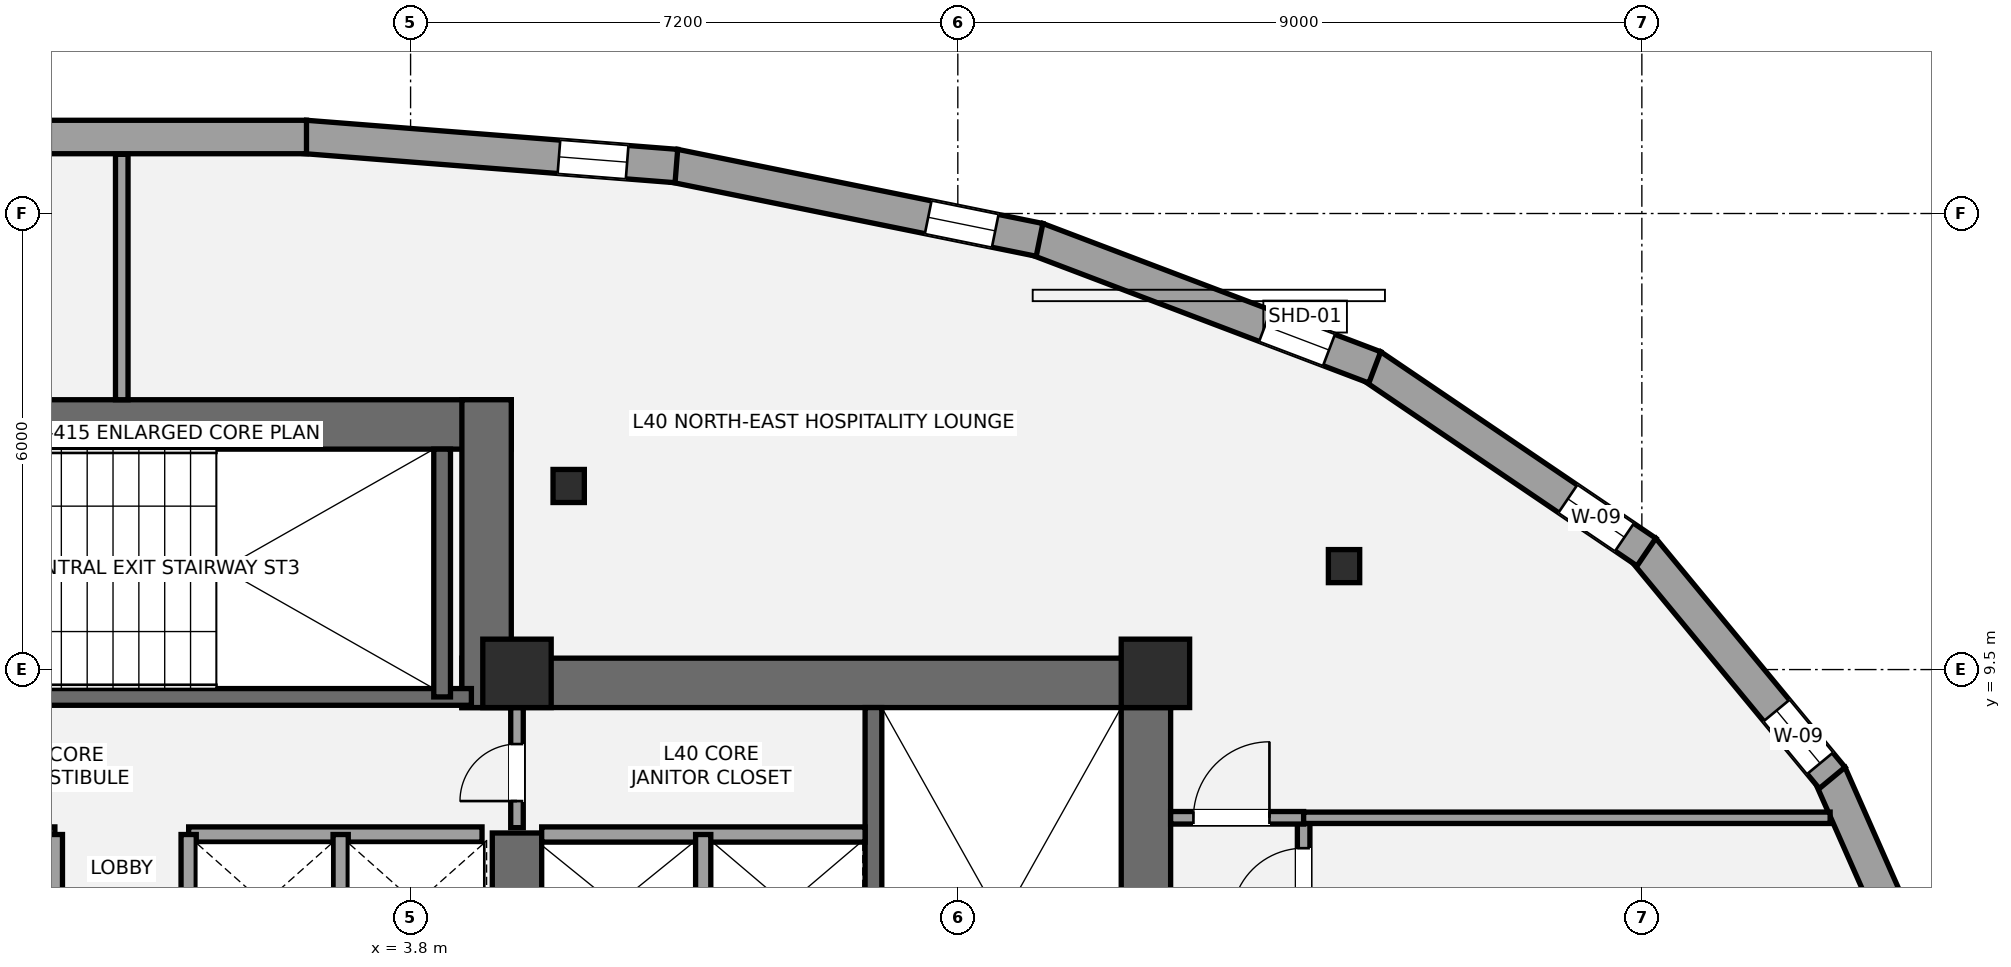
"""IFC4 building model, lengths in metres.
Left out: names, types, materials, properties, quantities, classifications, styles, units other than length and angle.
Written with IfcOpenShell. Run it as: python <this file> out.ifc"""

import sys

from ifc_helpers import new_model, si_unit, direction, frame, frame_2d, origin, origin_2d, place, context, subcontext, project, spatial, rectangle, i_section, extrude, element, fill, save


model = new_model("IFC4")
c1 = context("Model", 3, precision=1e-05, world=origin(), true_north=direction((0.0, 1.0)))
c2 = subcontext(c1, "Body", "Model", "MODEL_VIEW")
j1 = project(units=[si_unit("LENGTHUNIT", "METRE"), si_unit("PLANEANGLEUNIT", "RADIAN")], contexts=[c1])
p1 = place(None, origin())
s1 = spatial("IfcSite", under=j1, at=p1, CompositionType="ELEMENT")
p2 = place(p1, origin())
s2 = spatial("IfcBuilding", under=s1, at=p2, CompositionType="ELEMENT")
p3 = place(p2, frame((0.0, 0.0, 150.2)))
s3 = spatial("IfcBuildingStorey", under=s2, at=p3, CompositionType="ELEMENT", Elevation=150.2)
p4 = place(p3, frame((13.475, 1.2, 0.0), z_axis=(0.0, 0.0, 1.0), x_axis=(0.0, 1.0, 0.0)))
e1 = element("IfcWall", 1, at=p4, inside=s3, PredefinedType="SHEAR", context=c2, shape_type="SweptSolid", body=[
    extrude(rectangle(XDim=8.45, YDim=0.65, at=frame_2d((4.225, 0.0))), origin(), (0.0, 0.0, 1.0), 3.2),
])
p5 = place(p3, frame((4.475, 9.325, 0.0), z_axis=(0.0, 0.0, 1.0), x_axis=(1.0, 0.0, 0.0)))
e2 = element("IfcWall", 2, at=p5, inside=s3, PredefinedType="SHEAR", context=c2, shape_type="SweptSolid", body=[
    extrude(rectangle(XDim=9.325, YDim=0.65, at=frame_2d((4.663, 0.0))), origin(), (0.0, 0.0, 1.0), 3.2),
])
p6 = place(p3, frame((5.2, 5.35, 0.0), z_axis=(0.0, 0.0, 1.0), x_axis=(0.0, 1.0, 0.0)))
e3 = element("IfcWall", 3, at=p6, inside=s3, PredefinedType="SHEAR", context=c2, shape_type="SweptSolid", body=[
    extrude(rectangle(XDim=2.0, YDim=0.65, at=frame_2d((1.0, 0.0))), origin(), (0.0, 0.0, 1.0), 3.2),
])
p7 = place(p3, frame((9.89, 1.85, 0.0), z_axis=(0.0, 0.0, 1.0), x_axis=(0.0, 1.0, 0.0)))
e4 = element("IfcWall", 4, at=p7, inside=s3, PredefinedType="SHEAR", context=c2, shape_type="SweptSolid", body=[
    extrude(rectangle(XDim=7.15, YDim=0.22, at=frame_2d((3.575, 0.0))), origin(), (0.0, 0.0, 1.0), 3.2),
])
p8 = place(p3, frame((-5.125, 12.725, 0.0), z_axis=(0.0, 0.0, 1.0), x_axis=(1.0, 0.0, 0.0)))
e5 = element("IfcWall", 5, at=p8, inside=s3, PredefinedType="SHEAR", context=c2, shape_type="SweptSolid", body=[
    extrude(rectangle(XDim=10.25, YDim=0.65, at=frame_2d((5.125, 0.0))), origin(), (0.0, 0.0, 1.0), 3.2),
])
p9 = place(p3, frame((4.8, 9.0, 0.0), z_axis=(0.0, 0.0, 1.0), x_axis=(0.0, 1.0, 0.0)))
e6 = element("IfcWall", 6, at=p9, inside=s3, PredefinedType="SHEAR", context=c2, shape_type="SweptSolid", body=[
    extrude(rectangle(XDim=4.05, YDim=0.65, at=frame_2d((2.025, 0.0))), origin(), (0.0, 0.0, 1.0), 3.2),
])
p10 = place(p3, frame((-4.7, 9.14, 0.0), z_axis=(0.0, 0.0, 1.0), x_axis=(1.0, 0.0, 0.0)))
e7 = element("IfcWall", 7, at=p10, inside=s3, PredefinedType="SHEAR", context=c2, shape_type="SweptSolid", body=[
    extrude(rectangle(XDim=9.3, YDim=0.22, at=frame_2d((4.65, 0.0))), origin(), (0.0, 0.0, 1.0), 3.2),
])
p11 = place(p10, frame((1.15, 0.0, 0.0)))
e8 = element("IfcOpeningElement", 8, at=p11, cuts=e7, PredefinedType="OPENING", context=c2, shape_type="SweptSolid", body=[
    extrude(rectangle(XDim=1.05, YDim=2.15, at=frame_2d((0.525, 1.075))), frame((0.0, 0.12, 0.0), z_axis=(0.0, -1.0, 0.0), x_axis=(1.0, 0.0, 0.0)), (0.0, 0.0, 1.0), 0.24),
])
p12 = place(p3, frame((4.215, 9.14, 0.0), z_axis=(0.0, 0.0, 1.0), x_axis=(0.0, 1.0, 0.0)))
e9 = element("IfcWall", 9, at=p12, inside=s3, PredefinedType="SHEAR", context=c2, shape_type="SweptSolid", body=[
    extrude(rectangle(XDim=3.26, YDim=0.22, at=frame_2d((1.63, 0.0))), origin(), (0.0, 0.0, 1.0), 3.2),
])
for number, where, z_axis, x_axis in (
    (10, (5.2, 9.45, 0.0), (0.0, 0.0, 1.0), (1.0, 0.0, 0.0)),
    (11, (13.6, 9.45, 0.0), (0.0, 0.0, 1.0), (1.0, 0.0, 0.0)),
):
    element("IfcColumn", number, at=place(p3, frame(where, z_axis=z_axis, x_axis=x_axis)), inside=s3, PredefinedType="COLUMN", context=c2, shape_type="SweptSolid", body=[
        extrude(rectangle(XDim=0.9, YDim=0.9, at=origin_2d()), origin(), (0.0, 0.0, 1.0), 3.2),
    ])
for number, where, z_axis, x_axis in (
    (12, (16.082, 10.861, 0.0), (0.0, 0.0, 1.0), (1.0, 0.0, 0.0)),
    (13, (5.88, 11.915, 0.0), (0.0, 0.0, 1.0), (1.0, 0.0, 0.0)),
):
    element("IfcColumn", number, at=place(p3, frame(where, z_axis=z_axis, x_axis=x_axis)), inside=s3, PredefinedType="COLUMN", context=c2, shape_type="SweptSolid", body=[
        extrude(i_section(OverallWidth=0.412, OverallDepth=0.435, WebThickness=0.036, FlangeThickness=0.057, at=origin_2d()), origin(), (0.0, 0.0, 1.0), 3.2),
    ])
p13 = place(p3, frame((22.472, 8.126, 0.0), z_axis=(0.0, 0.0, 1.0), x_axis=(0.403999745193, -0.914759097186, 0.0)))
e14 = element("IfcWall", 14, at=p13, inside=s3, PredefinedType="STANDARD", context=c2, shape_type="SweptSolid", body=[
    extrude(rectangle(XDim=3.561, YDim=0.44, at=frame_2d((1.78, 0.0))), origin(), (0.0, 0.0, 1.0), 2.315),
])
p14 = place(p3, frame((20.014, 11.088, 0.0), z_axis=(0.0, 0.0, 1.0), x_axis=(0.637002505989, -0.77086173038, 0.0)))
e15 = element("IfcWall", 15, at=p14, inside=s3, PredefinedType="STANDARD", context=c2, shape_type="SweptSolid", body=[
    extrude(rectangle(XDim=3.908, YDim=0.44, at=frame_2d((1.954, 0.0))), origin(), (0.0, 0.0, 1.0), 2.315),
])
p15 = place(p14, frame((2.76, 0.0, 0.58)))
e16 = element("IfcOpeningElement", 16, at=p15, cuts=e15, PredefinedType="OPENING", context=c2, shape_type="SweptSolid", body=[
    extrude(rectangle(XDim=0.9, YDim=1.35, at=frame_2d((0.45, 0.675))), frame((0.0, 0.23, 0.0), z_axis=(0.0, -1.0, 0.0), x_axis=(1.0, 0.0, 0.0)), (0.0, 0.0, 1.0), 0.46),
])
p16 = place(p3, frame((16.441, 13.499, 0.0), z_axis=(0.0, 0.0, 1.0), x_axis=(0.827782339513, -0.561049372507, 0.0)))
e17 = element("IfcWall", 17, at=p16, inside=s3, PredefinedType="STANDARD", context=c2, shape_type="SweptSolid", body=[
    extrude(rectangle(XDim=4.372, YDim=0.44, at=frame_2d((2.186, 0.0))), origin(), (0.0, 0.0, 1.0), 2.315),
])
p17 = place(p16, frame((3.124, 0.0, 0.58)))
e18 = element("IfcOpeningElement", 18, at=p17, cuts=e17, PredefinedType="OPENING", context=c2, shape_type="SweptSolid", body=[
    extrude(rectangle(XDim=0.9, YDim=1.35, at=frame_2d((0.45, 0.675))), frame((0.0, 0.23, 0.0), z_axis=(0.0, -1.0, 0.0), x_axis=(1.0, 0.0, 0.0)), (0.0, 0.0, 1.0), 0.46),
])
p18 = place(p3, frame((12.041, 15.163, 0.0), z_axis=(0.0, 0.0, 1.0), x_axis=(0.93488004884, -0.354963792916, 0.0)))
e19 = element("IfcWall", 19, at=p18, inside=s3, PredefinedType="STANDARD", context=c2, shape_type="SweptSolid", body=[
    extrude(rectangle(XDim=4.755, YDim=0.44, at=frame_2d((2.377, 0.0))), origin(), (0.0, 0.0, 1.0), 2.315),
])
p19 = place(p18, frame((3.21, 0.0, 0.58)))
e20 = element("IfcOpeningElement", 20, at=p19, cuts=e19, PredefinedType="OPENING", context=c2, shape_type="SweptSolid", body=[
    extrude(rectangle(XDim=0.9, YDim=1.35, at=frame_2d((0.45, 0.675))), frame((0.0, 0.23, 0.0), z_axis=(0.0, -1.0, 0.0), x_axis=(1.0, 0.0, 0.0)), (0.0, 0.0, 1.0), 0.46),
])
p20 = place(p3, frame((7.271, 16.128, 0.0), z_axis=(0.0, 0.0, 1.0), x_axis=(0.980021305588, -0.198892535291, 0.0)))
e21 = element("IfcWall", 21, at=p20, inside=s3, PredefinedType="STANDARD", context=c2, shape_type="SweptSolid", body=[
    extrude(rectangle(XDim=4.903, YDim=0.44, at=frame_2d((2.451, 0.0))), origin(), (0.0, 0.0, 1.0), 2.315),
])
p21 = place(p20, frame((3.408, 0.0, 0.58)))
e22 = element("IfcOpeningElement", 22, at=p21, cuts=e21, PredefinedType="OPENING", context=c2, shape_type="SweptSolid", body=[
    extrude(rectangle(XDim=0.9, YDim=1.35, at=frame_2d((0.45, 0.675))), frame((0.0, 0.23, 0.0), z_axis=(0.0, -1.0, 0.0), x_axis=(1.0, 0.0, 0.0)), (0.0, 0.0, 1.0), 0.46),
])
p22 = place(p3, frame((2.413, 16.507, 0.0), z_axis=(0.0, 0.0, 1.0), x_axis=(0.996946218403, -0.078091213409, 0.0)))
e23 = element("IfcWall", 23, at=p22, inside=s3, PredefinedType="STANDARD", context=c2, shape_type="SweptSolid", body=[
    extrude(rectangle(XDim=4.899, YDim=0.44, at=frame_2d((2.449, 0.0))), origin(), (0.0, 0.0, 1.0), 2.315),
])
p23 = place(p22, frame((3.349, 0.0, 0.58)))
e24 = element("IfcOpeningElement", 24, at=p23, cuts=e23, PredefinedType="OPENING", context=c2, shape_type="SweptSolid", body=[
    extrude(rectangle(XDim=0.9, YDim=1.35, at=frame_2d((0.45, 0.675))), frame((0.0, 0.23, 0.0), z_axis=(0.0, -1.0, 0.0), x_axis=(1.0, 0.0, 0.0)), (0.0, 0.0, 1.0), 0.46),
])
p24 = place(p3, frame((-2.43, 16.507, 0.0), z_axis=(0.0, 0.0, 1.0), x_axis=(1.0, 0.0, 0.0)))
e25 = element("IfcWall", 25, at=p24, inside=s3, PredefinedType="STANDARD", context=c2, shape_type="SweptSolid", body=[
    extrude(rectangle(XDim=4.861, YDim=0.44, at=frame_2d((2.43, 0.0))), origin(), (0.0, 0.0, 1.0), 2.315),
])
p25 = place(p24, frame((0.596, 0.0, 0.58)))
e26 = element("IfcOpeningElement", 26, at=p25, cuts=e25, PredefinedType="OPENING", context=c2, shape_type="SweptSolid", body=[
    extrude(rectangle(XDim=0.9, YDim=1.35, at=frame_2d((0.45, 0.675))), frame((0.0, 0.23, 0.0), z_axis=(0.0, -1.0, 0.0), x_axis=(1.0, 0.0, 0.0)), (0.0, 0.0, 1.0), 0.46),
])
p26 = place(p3, frame((5.525, 7.33, 0.0), z_axis=(0.0, 0.0, 1.0), x_axis=(1.0, 0.0, 0.0)))
e27 = element("IfcWall", 27, at=p26, inside=s3, PredefinedType="SOLIDWALL", context=c2, shape_type="SweptSolid", body=[
    extrude(rectangle(XDim=4.255, YDim=0.2, at=frame_2d((2.127, 0.0))), origin(), (0.0, 0.0, 1.0), 3.02),
])
p27 = place(p3, frame((7.65, 5.47, 0.0), z_axis=(0.0, 0.0, 1.0), x_axis=(0.0, 1.0, 0.0)))
e28 = element("IfcWall", 28, at=p27, inside=s3, PredefinedType="SOLIDWALL", context=c2, shape_type="SweptSolid", body=[
    extrude(rectangle(XDim=1.86, YDim=0.2, at=frame_2d((0.93, 0.0))), origin(), (0.0, 0.0, 1.0), 3.02),
])
for number, where, z_axis, x_axis in (
    (29, (-4.74, 7.33, 0.0), (0.0, 0.0, 1.0), (1.0, 0.0, 0.0)),
    (30, (0.88, 7.33, 0.0), (0.0, 0.0, 1.0), (1.0, 0.0, 0.0)),
):
    element("IfcWall", number, at=place(p3, frame(where, z_axis=z_axis, x_axis=x_axis)), inside=s3, PredefinedType="SOLIDWALL", context=c2, shape_type="SweptSolid", body=[
        extrude(rectangle(XDim=3.86, YDim=0.2, at=frame_2d((1.93, 0.0))), origin(), (0.0, 0.0, 1.0), 3.02),
    ])
for number, where, z_axis, x_axis in (
    (31, (2.88, 5.52, 0.0), (0.0, 0.0, 1.0), (0.0, 1.0, 0.0)),
    (32, (-0.88, 5.52, 0.0), (0.0, 0.0, 1.0), (0.0, 1.0, 0.0)),
    (33, (0.88, 5.52, 0.0), (0.0, 0.0, 1.0), (0.0, 1.0, 0.0)),
):
    element("IfcWall", number, at=place(p3, frame(where, z_axis=z_axis, x_axis=x_axis)), inside=s3, PredefinedType="SOLIDWALL", context=c2, shape_type="SweptSolid", body=[
        extrude(rectangle(XDim=1.81, YDim=0.2, at=frame_2d((0.905, 0.0))), origin(), (0.0, 0.0, 1.0), 3.02),
    ])
p28 = place(p3, frame((5.2, 7.42, 0.0), z_axis=(0.0, 0.0, 1.0), x_axis=(0.0, 1.0, 0.0)))
e34 = element("IfcWall", 34, at=p28, inside=s3, PredefinedType="PARTITIONING", context=c2, shape_type="SweptSolid", body=[
    extrude(rectangle(XDim=1.58, YDim=0.165, at=frame_2d((0.79, 0.0))), origin(), (0.0, 0.0, 1.0), 3.02),
])
p29 = place(p28, frame((0.35, 0.0, 0.0)))
e35 = element("IfcOpeningElement", 35, at=p29, cuts=e34, PredefinedType="OPENING", context=c2, shape_type="SweptSolid", body=[
    extrude(rectangle(XDim=0.75, YDim=2.1, at=frame_2d((0.375, 1.05))), frame((0.0, 0.093, 0.0), z_axis=(0.0, -1.0, 0.0), x_axis=(1.0, 0.0, 0.0)), (0.0, 0.0, 1.0), 0.185),
])
p30 = place(p3, frame((15.55, -13.587, 0.0), z_axis=(0.0, 0.0, 1.0), x_axis=(0.0, 1.0, 0.0)))
e36 = element("IfcWall", 36, at=p30, inside=s3, PredefinedType="PARTITIONING", context=c2, shape_type="SweptSolid", body=[
    extrude(rectangle(XDim=21.137, YDim=0.165, at=frame_2d((10.568, 0.0))), origin(), (0.0, 0.0, 1.0), 2.473),
])
p31 = place(p30, frame((6.587, 0.0, 0.0)))
e37 = element("IfcOpeningElement", 37, at=p31, cuts=e36, PredefinedType="OPENING", context=c2, shape_type="SweptSolid", body=[
    extrude(rectangle(XDim=0.85, YDim=2.1, at=frame_2d((0.425, 1.05))), frame((0.0, 0.093, 0.0), z_axis=(0.0, -1.0, 0.0), x_axis=(1.0, 0.0, 0.0)), (0.0, 0.0, 1.0), 0.185),
])
p32 = place(p30, frame((10.637, 0.0, 0.0)))
e38 = element("IfcOpeningElement", 38, at=p32, cuts=e36, PredefinedType="OPENING", context=c2, shape_type="SweptSolid", body=[
    extrude(rectangle(XDim=0.95, YDim=2.15, at=frame_2d((0.475, 1.075))), frame((0.0, 0.093, 0.0), z_axis=(0.0, -1.0, 0.0), x_axis=(1.0, 0.0, 0.0)), (0.0, 0.0, 1.0), 0.185),
])
p33 = place(p30, frame((15.037, 0.0, 0.0)))
e39 = element("IfcOpeningElement", 39, at=p33, cuts=e36, PredefinedType="OPENING", context=c2, shape_type="SweptSolid", body=[
    extrude(rectangle(XDim=0.95, YDim=2.15, at=frame_2d((0.475, 1.075))), frame((0.0, 0.093, 0.0), z_axis=(0.0, -1.0, 0.0), x_axis=(1.0, 0.0, 0.0)), (0.0, 0.0, 1.0), 0.185),
])
p34 = place(p30, frame((19.787, 0.0, 0.0)))
e40 = element("IfcOpeningElement", 40, at=p34, cuts=e36, PredefinedType="OPENING", context=c2, shape_type="SweptSolid", body=[
    extrude(rectangle(XDim=0.95, YDim=2.15, at=frame_2d((0.475, 1.075))), frame((0.0, 0.093, 0.0), z_axis=(0.0, -1.0, 0.0), x_axis=(1.0, 0.0, 0.0)), (0.0, 0.0, 1.0), 0.185),
])
p35 = place(p3, frame((13.8, 7.55, 0.0), z_axis=(0.0, 0.0, 1.0), x_axis=(1.0, 0.0, 0.0)))
e41 = element("IfcWall", 41, at=p35, inside=s3, PredefinedType="PARTITIONING", context=c2, shape_type="SweptSolid", body=[
    extrude(rectangle(XDim=1.75, YDim=0.165, at=frame_2d((0.875, 0.0))), origin(), (0.0, 0.0, 1.0), 3.02),
])
p36 = place(p35, frame((0.3, 0.0, 0.0)))
e42 = element("IfcOpeningElement", 42, at=p36, cuts=e41, PredefinedType="OPENING", context=c2, shape_type="SweptSolid", body=[
    extrude(rectangle(XDim=1.0, YDim=2.15, at=frame_2d((0.5, 1.075))), frame((0.0, 0.093, 0.0), z_axis=(0.0, -1.0, 0.0), x_axis=(1.0, 0.0, 0.0)), (0.0, 0.0, 1.0), 0.185),
])
p37 = place(p3, frame((15.55, 7.55, 0.0), z_axis=(0.0, 0.0, 1.0), x_axis=(1.0, 0.0, 0.0)))
e43 = element("IfcWall", 43, at=p37, inside=s3, PredefinedType="PLUMBINGWALL", context=c2, shape_type="SweptSolid", body=[
    extrude(rectangle(XDim=6.927, YDim=0.15, at=frame_2d((3.464, 0.0))), origin(), (0.0, 0.0, 1.0), 3.02),
])
p38 = place(p3, frame((0.0, 13.05, 0.0), z_axis=(0.0, 0.0, 1.0), x_axis=(0.0, 1.0, 0.0)))
e44 = element("IfcWall", 44, at=p38, inside=s3, PredefinedType="PARTITIONING", context=c2, shape_type="SweptSolid", body=[
    extrude(rectangle(XDim=3.229, YDim=0.165, at=frame_2d((1.614, 0.0))), origin(), (0.0, 0.0, 1.0), 3.02),
])
p39 = place(p15, origin())
e45 = element("IfcWindow", 45, at=p39, inside=s3, PartitioningType="SINGLE_PANEL", PredefinedType="WINDOW", context=c2, shape_type="SweptSolid", body=[
    extrude(rectangle(XDim=0.9, YDim=1.35, at=frame_2d((0.45, 0.675))), frame((0.0, -0.01, 0.0), z_axis=(0.0, -1.0, 0.0), x_axis=(1.0, 0.0, 0.0)), (0.0, 0.0, 1.0), 0.06),
])
fill(e16, e45)
p40 = place(p17, origin())
e46 = element("IfcWindow", 46, at=p40, inside=s3, PartitioningType="SINGLE_PANEL", PredefinedType="WINDOW", context=c2, shape_type="SweptSolid", body=[
    extrude(rectangle(XDim=0.9, YDim=1.35, at=frame_2d((0.45, 0.675))), frame((0.0, -0.01, 0.0), z_axis=(0.0, -1.0, 0.0), x_axis=(1.0, 0.0, 0.0)), (0.0, 0.0, 1.0), 0.06),
])
fill(e18, e46)
p41 = place(p19, origin())
e47 = element("IfcWindow", 47, at=p41, inside=s3, PartitioningType="SINGLE_PANEL", PredefinedType="WINDOW", context=c2, shape_type="SweptSolid", body=[
    extrude(rectangle(XDim=0.9, YDim=1.35, at=frame_2d((0.45, 0.675))), frame((0.0, -0.01, 0.0), z_axis=(0.0, -1.0, 0.0), x_axis=(1.0, 0.0, 0.0)), (0.0, 0.0, 1.0), 0.06),
])
fill(e20, e47)
p42 = place(p21, origin())
e48 = element("IfcWindow", 48, at=p42, inside=s3, PartitioningType="SINGLE_PANEL", PredefinedType="WINDOW", context=c2, shape_type="SweptSolid", body=[
    extrude(rectangle(XDim=0.9, YDim=1.35, at=frame_2d((0.45, 0.675))), frame((0.0, -0.01, 0.0), z_axis=(0.0, -1.0, 0.0), x_axis=(1.0, 0.0, 0.0)), (0.0, 0.0, 1.0), 0.06),
])
fill(e22, e48)
p43 = place(p23, origin())
e49 = element("IfcWindow", 49, at=p43, inside=s3, PartitioningType="SINGLE_PANEL", PredefinedType="WINDOW", context=c2, shape_type="SweptSolid", body=[
    extrude(rectangle(XDim=0.9, YDim=1.35, at=frame_2d((0.45, 0.675))), frame((0.0, -0.01, 0.0), z_axis=(0.0, -1.0, 0.0), x_axis=(1.0, 0.0, 0.0)), (0.0, 0.0, 1.0), 0.06),
])
fill(e24, e49)
p44 = place(p29, origin())
e50 = element("IfcDoor", 50, at=p44, inside=s3, OperationType="SINGLE_SWING_LEFT", PredefinedType="DOOR", context=c2, shape_type="SweptSolid", body=[
    extrude(rectangle(XDim=0.75, YDim=2.1, at=frame_2d((0.375, 1.05))), frame((0.0, 0.025, 0.0), z_axis=(0.0, -1.0, 0.0), x_axis=(1.0, 0.0, 0.0)), (0.0, 0.0, 1.0), 0.05),
])
fill(e35, e50)
p45 = place(p36, origin())
e51 = element("IfcDoor", 51, at=p45, inside=s3, OperationType="SINGLE_SWING_RIGHT", PredefinedType="DOOR", context=c2, shape_type="SweptSolid", body=[
    extrude(rectangle(XDim=1.0, YDim=2.15, at=frame_2d((0.5, 1.075))), frame((0.0, 0.025, 0.0), z_axis=(0.0, -1.0, 0.0), x_axis=(1.0, 0.0, 0.0)), (0.0, 0.0, 1.0), 0.05),
])
fill(e42, e51)
p46 = place(p34, origin())
e52 = element("IfcDoor", 52, at=p46, inside=s3, OperationType="SINGLE_SWING_LEFT", PredefinedType="DOOR", context=c2, shape_type="SweptSolid", body=[
    extrude(rectangle(XDim=0.95, YDim=2.15, at=frame_2d((0.475, 1.075))), frame((0.0, 0.025, 0.0), z_axis=(0.0, -1.0, 0.0), x_axis=(1.0, 0.0, 0.0)), (0.0, 0.0, 1.0), 0.05),
])
fill(e40, e52)
save(model, sys.argv[1])
